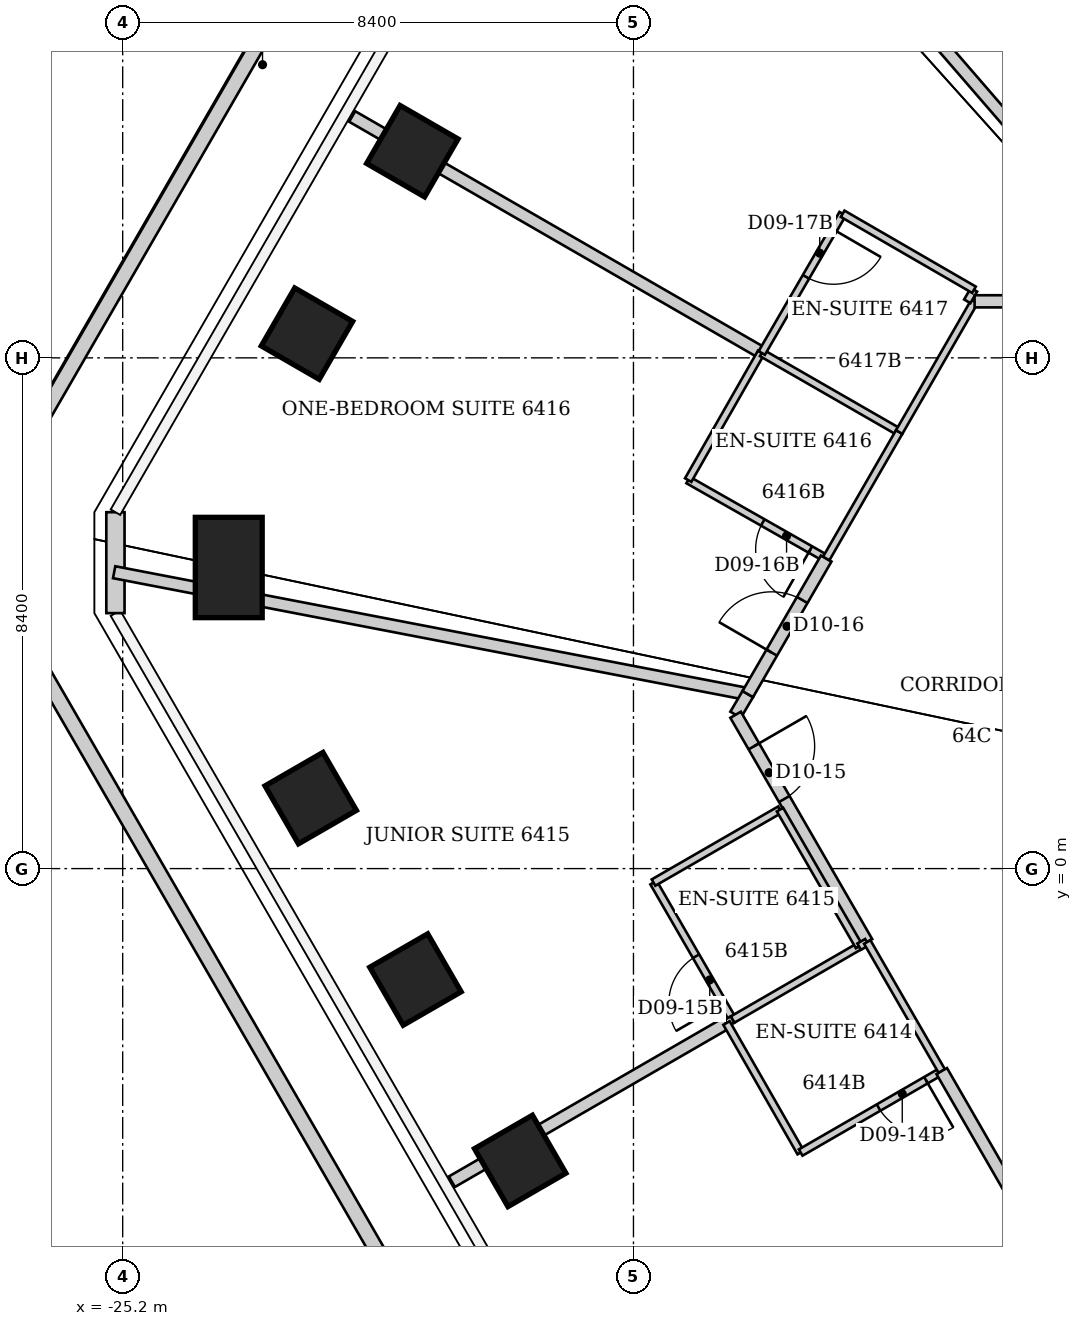
"""IFC4 building model, lengths in metres.
Left out: names, types, materials, properties, quantities, classifications, styles, units other than length and angle.
Written with IfcOpenShell. Run it as: python <this file> out.ifc"""

import sys

from ifc_helpers import new_model, si_unit, direction, frame, frame_2d, origin, origin_2d, place, context, subcontext, project, spatial, rectangle, extrude, clip, halfspace, element, fill, save


model = new_model("IFC4")
c1 = context("Model", 3, precision=1e-05, world=origin(), true_north=direction((0.0, 1.0)))
c2 = subcontext(c1, "Body", "Model", "MODEL_VIEW")
j1 = project(units=[si_unit("LENGTHUNIT", "METRE"), si_unit("PLANEANGLEUNIT", "RADIAN")], contexts=[c1])
p1 = place(None, origin())
s1 = spatial("IfcSite", under=j1, at=p1, CompositionType="ELEMENT")
p2 = place(p1, origin())
s2 = spatial("IfcBuilding", under=s1, at=p2, CompositionType="ELEMENT")
p3 = place(p2, frame((0.0, 0.0, 257.0)))
s3 = spatial("IfcBuildingStorey", under=s2, at=p3, CompositionType="ELEMENT", Elevation=257.0)
p4 = place(p3, frame((-18.663, -4.808, -0.052), z_axis=(0.0, 0.0, 1.0), x_axis=(-0.866025403784, -0.5, 0.0)))
e1 = element("IfcColumn", 1, at=p4, inside=s3, PredefinedType="COLUMN", context=c2, shape_type="SweptSolid", body=[
    clip(extrude(rectangle(XDim=1.1, YDim=1.1, at=origin_2d()), origin(), (0.0, 0.0, 1.0), 3.852), halfspace(frame((0.0, 0.0, 0.052)), True)),
])
p5 = place(p3, frame((-20.385, -1.824, -0.06), z_axis=(0.0, 0.0, 1.0), x_axis=(-0.866025403784, -0.5, 0.0)))
e2 = element("IfcColumn", 2, at=p5, inside=s3, PredefinedType="COLUMN", context=c2, shape_type="SweptSolid", body=[
    clip(extrude(rectangle(XDim=1.1, YDim=1.1, at=origin_2d()), origin(), (0.0, 0.0, 1.0), 3.86), halfspace(frame((0.0, 0.0, 0.06)), True)),
])
p6 = place(p3, frame((-22.108, 1.159, -0.067), z_axis=(0.0, 0.0, 1.0), x_axis=(-0.866025403784, -0.5, 0.0)))
e3 = element("IfcColumn", 3, at=p6, inside=s3, PredefinedType="COLUMN", context=c2, shape_type="SweptSolid", body=[
    clip(extrude(rectangle(XDim=1.1, YDim=1.1, at=origin_2d()), origin(), (0.0, 0.0, 1.0), 3.867), halfspace(frame((0.0, 0.0, 0.067)), True)),
])
p7 = place(p3, frame((-23.456, 4.952, -0.069), z_axis=(0.0, 0.0, 1.0), x_axis=(-1.0, 0.0, 0.0)))
e4 = element("IfcColumn", 4, at=p7, inside=s3, PredefinedType="COLUMN", context=c2, shape_type="SweptSolid", body=[
    clip(extrude(rectangle(XDim=1.1, YDim=1.65, at=origin_2d()), origin(), (0.0, 0.0, 1.0), 3.869), halfspace(frame((0.0, 0.0, 0.069)), True)),
])
p8 = place(p3, frame((-22.169, 8.798, -0.059), z_axis=(0.0, 0.0, 1.0), x_axis=(-0.866025403784, 0.5, 0.0)))
e5 = element("IfcColumn", 5, at=p8, inside=s3, PredefinedType="COLUMN", context=c2, shape_type="SweptSolid", body=[
    clip(extrude(rectangle(XDim=1.1, YDim=1.1, at=origin_2d()), origin(), (0.0, 0.0, 1.0), 3.859), halfspace(frame((0.0, 0.0, 0.059)), True)),
])
p9 = place(p3, frame((-20.437, 11.799, -0.051), z_axis=(0.0, 0.0, 1.0), x_axis=(-0.866025403784, 0.5, 0.0)))
e6 = element("IfcColumn", 6, at=p9, inside=s3, PredefinedType="COLUMN", context=c2, shape_type="SweptSolid", body=[
    clip(extrude(rectangle(XDim=1.1, YDim=1.1, at=origin_2d()), origin(), (0.0, 0.0, 1.0), 3.851), halfspace(frame((0.0, 0.0, 0.051)), True)),
])
p10 = place(p3, frame((-25.319, 4.202, 0.0), z_axis=(0.0, 0.0, 1.0), x_axis=(0.0, 1.0, 0.0)))
e7 = element("IfcWall", 7, at=p10, inside=s3, PredefinedType="SOLIDWALL", context=c2, shape_type="SweptSolid", body=[
    extrude(rectangle(XDim=1.66, YDim=0.3, at=frame_2d((0.83, 0.0))), origin(), (0.0, 0.0, 1.0), 3.64),
])
p11 = place(p3, frame((-18.994, 20.465, 0.0), z_axis=(0.0, 0.0, 1.0), x_axis=(-0.49999647861, -0.86602743685, 0.0)))
e8 = element("IfcWall", 8, at=p11, inside=s3, PredefinedType="PARAPET", context=c2, shape_type="SweptSolid", body=[
    extrude(rectangle(XDim=16.453, YDim=0.25, at=frame_2d((8.226, 0.0))), origin(), (0.0, 0.0, 1.0), 1.1),
])
p12 = place(p3, frame((-27.219, 4.456, 0.0), z_axis=(0.0, 0.0, 1.0), x_axis=(0.499998496786, -0.866026271663, 0.0)))
e9 = element("IfcWall", 9, at=p12, inside=s3, PredefinedType="PARAPET", context=c2, shape_type="SweptSolid", body=[
    extrude(rectangle(XDim=34.936, YDim=0.25, at=frame_2d((17.468, 0.0))), origin(), (0.0, 0.0, 1.0), 1.1),
])
p13 = place(p3, frame((-25.341, 4.874, 0.0), z_axis=(0.0, 0.0, 1.0), x_axis=(0.982001168061, -0.188874841966, 0.0)))
e10 = element("IfcWall", 10, at=p13, inside=s3, PredefinedType="PARTITIONING", context=c2, shape_type="SweptSolid", body=[
    extrude(rectangle(XDim=10.557, YDim=0.2, at=frame_2d((5.278, 0.0))), origin(), (0.0, 0.0, 1.0), 3.64),
])
p14 = place(p3, frame((-21.426, 12.37, 0.0), z_axis=(0.0, 0.0, 1.0), x_axis=(0.866202335538, -0.499693419917, 0.0)))
e11 = element("IfcWall", 11, at=p14, inside=s3, PredefinedType="PARTITIONING", context=c2, shape_type="SweptSolid", body=[
    extrude(rectangle(XDim=7.765, YDim=0.2, at=frame_2d((3.883, 0.0))), origin(), (0.0, 0.0, 1.0), 2.878),
])
p15 = place(p3, frame((-19.786, -5.15, 0.0), z_axis=(0.0, 0.0, 1.0), x_axis=(0.865819112627, 0.500357136663, 0.0)))
e12 = element("IfcWall", 12, at=p15, inside=s3, PredefinedType="PARTITIONING", context=c2, shape_type="SweptSolid", body=[
    extrude(rectangle(XDim=5.216, YDim=0.2, at=frame_2d((2.608, 0.0))), origin(), (0.0, 0.0, 1.0), 3.64),
])
p16 = place(p3, frame((-16.89, 19.507, 0.0), z_axis=(0.0, 0.0, 1.0), x_axis=(0.654250750888, -0.756277696989, 0.0)))
e13 = element("IfcWall", 13, at=p16, inside=s3, PredefinedType="PARTITIONING", context=c2, shape_type="SweptSolid", body=[
    extrude(rectangle(XDim=10.313, YDim=0.2, at=frame_2d((5.157, 0.0))), origin(), (0.0, 0.0, 1.0), 3.64),
])
p17 = place(p3, frame((-16.47, -0.23, 0.0), z_axis=(0.0, 0.0, 1.0), x_axis=(0.500291685314, -0.865856933682, 0.0)))
e14 = element("IfcWall", 14, at=p17, inside=s3, PredefinedType="PARTITIONING", context=c2, shape_type="SweptSolid", body=[
    extrude(rectangle(XDim=2.599, YDim=0.12, at=frame_2d((1.299, 0.0))), origin(), (0.0, 0.0, 1.0), 3.64),
])
p18 = place(p17, frame((1.399, 0.0, 0.0)))
e15 = element("IfcOpeningElement", 15, at=p18, cuts=e14, PredefinedType="OPENING", context=c2, shape_type="SweptSolid", body=[
    extrude(rectangle(XDim=0.9, YDim=2.03, at=frame_2d((0.45, 1.015))), frame((0.0, 0.06, 0.0), z_axis=(0.0, -1.0, 0.0), x_axis=(1.0, 0.0, 0.0)), (0.0, 0.0, 1.0), 0.12),
])
p19 = place(p3, frame((-15.9, 6.39, 0.0), z_axis=(0.0, 0.0, 1.0), x_axis=(0.869431908012, -0.494052787999, 0.0)))
e16 = element("IfcWall", 16, at=p19, inside=s3, PredefinedType="PARTITIONING", context=c2, shape_type="SweptSolid", body=[
    extrude(rectangle(XDim=2.611, YDim=0.12, at=frame_2d((1.305, 0.0))), origin(), (0.0, 0.0, 1.0), 3.64),
])
p20 = place(p19, frame((1.411, 0.0, 0.0)))
e17 = element("IfcOpeningElement", 17, at=p20, cuts=e16, PredefinedType="OPENING", context=c2, shape_type="SweptSolid", body=[
    extrude(rectangle(XDim=0.9, YDim=2.03, at=frame_2d((0.45, 1.015))), frame((0.0, 0.06, 0.0), z_axis=(0.0, -1.0, 0.0), x_axis=(1.0, 0.0, 0.0)), (0.0, 0.0, 1.0), 0.12),
])
p21 = place(p3, frame((-15.27, -2.54, 0.0), z_axis=(0.0, 0.0, 1.0), x_axis=(0.864612942288, 0.502438513678, 0.0)))
e18 = element("IfcWall", 18, at=p21, inside=s3, PredefinedType="PARTITIONING", context=c2, shape_type="SweptSolid", body=[
    extrude(rectangle(XDim=0.117, YDim=0.12, at=frame_2d((0.058, 0.0))), origin(), (0.0, 0.0, 1.0), 3.64),
])
p22 = place(p3, frame((-15.27, -2.54, 0.0), z_axis=(0.0, 0.0, 1.0), x_axis=(0.497027744361, -0.86773464915, 0.0)))
e19 = element("IfcWall", 19, at=p22, inside=s3, PredefinedType="PARTITIONING", context=c2, shape_type="SweptSolid", body=[
    extrude(rectangle(XDim=2.455, YDim=0.12, at=frame_2d((1.227, 0.0))), origin(), (0.0, 0.0, 1.0), 3.64),
])
p23 = place(p3, frame((-15.169, -2.482, 0.0), z_axis=(0.0, 0.0, 1.0), x_axis=(0.865723129019, 0.500523190154, 0.0)))
e20 = element("IfcWall", 20, at=p23, inside=s3, PredefinedType="PARTITIONING", context=c2, shape_type="SweptSolid", body=[
    extrude(rectangle(XDim=2.401, YDim=0.12, at=frame_2d((1.201, 0.0))), origin(), (0.0, 0.0, 1.0), 3.64),
])
p24 = place(p3, frame((-15.12, 2.53, 0.0), z_axis=(0.0, 0.0, 1.0), x_axis=(0.507290461451, 0.861775137562, 0.0)))
e21 = element("IfcWall", 21, at=p24, inside=s3, PredefinedType="PARTITIONING", context=c2, shape_type="SweptSolid", body=[
    extrude(rectangle(XDim=0.395, YDim=0.2, at=frame_2d((0.197, 0.0))), origin(), (0.0, 0.0, 1.0), 3.64),
])
p25 = place(p3, frame((-15.12, 2.53, 0.0), z_axis=(0.0, 0.0, 1.0), x_axis=(0.500151395541, -0.865937977882, 0.0)))
e22 = element("IfcWall", 22, at=p25, inside=s3, PredefinedType="PARTITIONING", context=c2, shape_type="SweptSolid", body=[
    extrude(rectangle(XDim=4.319, YDim=0.2, at=frame_2d((2.16, 0.0))), origin(), (0.0, 0.0, 1.0), 3.64),
])
p26 = place(p25, frame((0.6, 0.0, 0.0)))
e23 = element("IfcOpeningElement", 23, at=p26, cuts=e22, PredefinedType="OPENING", context=c2, shape_type="SweptSolid", body=[
    extrude(rectangle(XDim=1.0, YDim=2.13, at=frame_2d((0.5, 1.065))), frame((0.0, 0.1, 0.0), z_axis=(0.0, -1.0, 0.0), x_axis=(1.0, 0.0, 0.0)), (0.0, 0.0, 1.0), 0.2),
])
p27 = place(p3, frame((-14.92, 2.87, 0.0), z_axis=(0.0, 0.0, 1.0), x_axis=(0.500714932888, 0.865612243434, 0.0)))
e24 = element("IfcWall", 24, at=p27, inside=s3, PredefinedType="PARTITIONING", context=c2, shape_type="SweptSolid", body=[
    extrude(rectangle(XDim=2.576, YDim=0.2, at=frame_2d((1.288, 0.0))), origin(), (0.0, 0.0, 1.0), 3.64),
])
p28 = place(p27, frame((0.788, 0.0, 0.0)))
e25 = element("IfcOpeningElement", 25, at=p28, cuts=e24, PredefinedType="OPENING", context=c2, shape_type="SweptSolid", body=[
    extrude(rectangle(XDim=1.0, YDim=2.13, at=frame_2d((0.5, 1.065))), frame((0.0, 0.1, 0.0), z_axis=(0.0, -1.0, 0.0), x_axis=(1.0, 0.0, 0.0)), (0.0, 0.0, 1.0), 0.2),
])
p29 = place(p3, frame((-14.7, 8.49, 0.0), z_axis=(0.0, 0.0, 1.0), x_axis=(-0.496106327528, -0.868261776072, 0.0)))
e26 = element("IfcWall", 26, at=p29, inside=s3, PredefinedType="PARTITIONING", context=c2, shape_type="SweptSolid", body=[
    extrude(rectangle(XDim=2.419, YDim=0.12, at=frame_2d((1.209, 0.0))), origin(), (0.0, 0.0, 1.0), 3.64),
])
p30 = place(p3, frame((-14.69, 8.48, 0.0), z_axis=(0.0, 0.0, 1.0), x_axis=(0.866816256489, -0.498627694264, 0.0)))
e27 = element("IfcWall", 27, at=p30, inside=s3, PredefinedType="PARTITIONING", context=c2, shape_type="SweptSolid", body=[
    extrude(rectangle(XDim=2.607, YDim=0.12, at=frame_2d((1.304, 0.0))), origin(), (0.0, 0.0, 1.0), 2.878),
])
p31 = place(p3, frame((-14.39, 0.97, 0.0), z_axis=(0.0, 0.0, 1.0), x_axis=(-0.866202511239, -0.499693115345, 0.0)))
e28 = element("IfcWall", 28, at=p31, inside=s3, PredefinedType="PARTITIONING", context=c2, shape_type="SweptSolid", body=[
    extrude(rectangle(XDim=2.401, YDim=0.12, at=frame_2d((1.201, 0.0))), origin(), (0.0, 0.0, 1.0), 3.64),
])
p32 = place(p3, frame((-14.05, -4.67, 0.0), z_axis=(0.0, 0.0, 1.0), x_axis=(0.865968562295, 0.500098439427, 0.0)))
e29 = element("IfcWall", 29, at=p32, inside=s3, PredefinedType="PARTITIONING", context=c2, shape_type="SweptSolid", body=[
    extrude(rectangle(XDim=2.679, YDim=0.12, at=frame_2d((1.34, 0.0))), origin(), (0.0, 0.0, 1.0), 3.64),
])
p33 = place(p32, frame((1.479, 0.0, 0.0)))
e30 = element("IfcOpeningElement", 30, at=p33, cuts=e29, PredefinedType="OPENING", context=c2, shape_type="SweptSolid", body=[
    extrude(rectangle(XDim=0.9, YDim=2.03, at=frame_2d((0.45, 1.015))), frame((0.0, 0.06, 0.0), z_axis=(0.0, -1.0, 0.0), x_axis=(1.0, 0.0, 0.0)), (0.0, 0.0, 1.0), 0.12),
])
p34 = place(p3, frame((-13.63, 5.1, 0.0), z_axis=(0.0, 0.0, 1.0), x_axis=(0.499737123639, 0.866177122335, 0.0)))
e31 = element("IfcWall", 31, at=p34, inside=s3, PredefinedType="PARTITIONING", context=c2, shape_type="SweptSolid", body=[
    extrude(rectangle(XDim=2.401, YDim=0.12, at=frame_2d((1.201, 0.0))), origin(), (0.0, 0.0, 1.0), 3.64),
])
p35 = place(p3, frame((-13.36, 10.77, 0.0), z_axis=(0.0, 0.0, 1.0), x_axis=(-0.502173326652, -0.864766991738, 0.0)))
e32 = element("IfcWall", 32, at=p35, inside=s3, PredefinedType="PARTITIONING", context=c2, shape_type="SweptSolid", body=[
    extrude(rectangle(XDim=2.648, YDim=0.12, at=frame_2d((1.324, 0.0))), origin(), (0.0, 0.0, 1.0), 3.64),
])
p36 = place(p35, frame((0.3, 0.0, 0.0)))
e33 = element("IfcOpeningElement", 33, at=p36, cuts=e32, PredefinedType="OPENING", context=c2, shape_type="SweptSolid", body=[
    extrude(rectangle(XDim=0.9, YDim=2.03, at=frame_2d((0.45, 1.015))), frame((0.0, 0.06, 0.0), z_axis=(0.0, -1.0, 0.0), x_axis=(1.0, 0.0, 0.0)), (0.0, 0.0, 1.0), 0.12),
])
p37 = place(p3, frame((-13.09, -1.28, 0.0), z_axis=(0.0, 0.0, 1.0), x_axis=(-0.500291685314, 0.865856933682, 0.0)))
e34 = element("IfcWall", 34, at=p37, inside=s3, PredefinedType="PARTITIONING", context=c2, shape_type="SweptSolid", body=[
    extrude(rectangle(XDim=2.599, YDim=0.12, at=frame_2d((1.299, 0.0))), origin(), (0.0, 0.0, 1.0), 3.64),
])
p38 = place(p3, frame((-13.088, -1.283, 0.0), z_axis=(0.0, 0.0, 1.0), x_axis=(0.867120749652, 0.498097987873, 0.0)))
e35 = element("IfcWall", 35, at=p38, inside=s3, PredefinedType="PARTITIONING", context=c2, shape_type="SweptSolid", body=[
    extrude(rectangle(XDim=0.147, YDim=0.12, at=frame_2d((0.074, 0.0))), origin(), (0.0, 0.0, 1.0), 3.64),
])
p39 = place(p3, frame((-12.955, -1.207, 0.0), z_axis=(0.0, 0.0, 1.0), x_axis=(0.499920767294, -0.866071143976, 0.0)))
e36 = element("IfcWall", 36, at=p39, inside=s3, PredefinedType="PARTITIONING", context=c2, shape_type="SweptSolid", body=[
    extrude(rectangle(XDim=2.451, YDim=0.12, at=frame_2d((1.226, 0.0))), origin(), (0.0, 0.0, 1.0), 3.64),
])
p40 = place(p3, frame((-12.43, 7.18, 0.0), z_axis=(0.0, 0.0, 1.0), x_axis=(0.499577688184, 0.866269088372, 0.0)))
e37 = element("IfcWall", 37, at=p40, inside=s3, PredefinedType="PARTITIONING", context=c2, shape_type="SweptSolid", body=[
    extrude(rectangle(XDim=2.482, YDim=0.12, at=frame_2d((1.241, 0.0))), origin(), (0.0, 0.0, 1.0), 3.64),
])
p41 = place(p3, frame((-11.73, -3.33, 0.0), z_axis=(0.0, 0.0, 1.0), x_axis=(0.499214067722, -0.866478686748, 0.0)))
e38 = element("IfcWall", 38, at=p41, inside=s3, PredefinedType="PARTITIONING", context=c2, shape_type="SweptSolid", body=[
    extrude(rectangle(XDim=8.413, YDim=0.2, at=frame_2d((4.207, 0.0))), origin(), (0.0, 0.0, 1.0), 3.64),
])
p42 = place(p41, frame((3.707, 0.0, 0.0)))
e39 = element("IfcOpeningElement", 39, at=p42, cuts=e38, PredefinedType="OPENING", context=c2, shape_type="SweptSolid", body=[
    extrude(rectangle(XDim=1.0, YDim=2.13, at=frame_2d((0.5, 1.065))), frame((0.0, 0.1, 0.0), z_axis=(0.0, -1.0, 0.0), x_axis=(1.0, 0.0, 0.0)), (0.0, 0.0, 1.0), 0.2),
])
p43 = place(p3, frame((-11.31, 9.33, 0.0), z_axis=(0.0, 0.0, 1.0), x_axis=(0.501518373175, 0.865146994081, 0.0)))
e40 = element("IfcWall", 40, at=p43, inside=s3, PredefinedType="PARTITIONING", context=c2, shape_type="SweptSolid", body=[
    extrude(rectangle(XDim=0.219, YDim=0.12, at=frame_2d((0.11, 0.0))), origin(), (0.0, 0.0, 1.0), 3.64),
])
p44 = place(p3, frame((-11.2, 9.52, 0.0), z_axis=(0.0, 0.0, 1.0), x_axis=(-0.865533423938, 0.500851167559, 0.0)))
e41 = element("IfcWall", 41, at=p44, inside=s3, PredefinedType="PARTITIONING", context=c2, shape_type="SweptSolid", body=[
    extrude(rectangle(XDim=2.496, YDim=0.12, at=frame_2d((1.248, 0.0))), origin(), (0.0, 0.0, 1.0), 3.64),
])
p45 = place(p3, frame((-8.08, 9.33, 0.0), z_axis=(0.0, 0.0, 1.0), x_axis=(-1.0, 0.0, 0.0)))
e42 = element("IfcWall", 42, at=p45, inside=s3, PredefinedType="PARTITIONING", context=c2, shape_type="SweptSolid", body=[
    extrude(rectangle(XDim=3.11, YDim=0.2, at=frame_2d((1.555, 0.0))), origin(), (0.0, 0.0, 1.0), 3.64),
])
p46 = place(p45, frame((1.055, 0.0, 0.0)))
e43 = element("IfcOpeningElement", 43, at=p46, cuts=e42, PredefinedType="OPENING", context=c2, shape_type="SweptSolid", body=[
    extrude(rectangle(XDim=1.0, YDim=2.13, at=frame_2d((0.5, 1.065))), frame((0.0, 0.1, 0.0), z_axis=(0.0, -1.0, 0.0), x_axis=(1.0, 0.0, 0.0)), (0.0, 0.0, 1.0), 0.2),
])
p47 = place(p33, origin())
e44 = element("IfcDoor", 44, at=p47, inside=s3, OperationType="SINGLE_SWING_RIGHT", PredefinedType="DOOR", context=c2, shape_type="SweptSolid", body=[
    extrude(rectangle(XDim=0.9, YDim=2.03, at=frame_2d((0.45, 1.015))), frame((0.0, 0.025, 0.0), z_axis=(0.0, -1.0, 0.0), x_axis=(1.0, 0.0, 0.0)), (0.0, 0.0, 1.0), 0.05),
])
fill(e30, e44)
p48 = place(p26, origin())
e45 = element("IfcDoor", 45, at=p48, inside=s3, OperationType="SINGLE_SWING_LEFT", PredefinedType="DOOR", context=c2, shape_type="SweptSolid", body=[
    extrude(rectangle(XDim=1.0, YDim=2.13, at=frame_2d((0.5, 1.065))), frame((0.0, 0.025, 0.0), z_axis=(0.0, -1.0, 0.0), x_axis=(1.0, 0.0, 0.0)), (0.0, 0.0, 1.0), 0.05),
])
fill(e23, e45)
p49 = place(p18, origin())
e46 = element("IfcDoor", 46, at=p49, inside=s3, OperationType="SINGLE_SWING_RIGHT", PredefinedType="DOOR", context=c2, shape_type="SweptSolid", body=[
    extrude(rectangle(XDim=0.9, YDim=2.03, at=frame_2d((0.45, 1.015))), frame((0.0, 0.025, 0.0), z_axis=(0.0, -1.0, 0.0), x_axis=(1.0, 0.0, 0.0)), (0.0, 0.0, 1.0), 0.05),
])
fill(e15, e46)
p50 = place(p28, origin())
e47 = element("IfcDoor", 47, at=p50, inside=s3, OperationType="SINGLE_SWING_LEFT", PredefinedType="DOOR", context=c2, shape_type="SweptSolid", body=[
    extrude(rectangle(XDim=1.0, YDim=2.13, at=frame_2d((0.5, 1.065))), frame((0.0, 0.025, 0.0), z_axis=(0.0, -1.0, 0.0), x_axis=(1.0, 0.0, 0.0)), (0.0, 0.0, 1.0), 0.05),
])
fill(e25, e47)
p51 = place(p20, origin())
e48 = element("IfcDoor", 48, at=p51, inside=s3, OperationType="SINGLE_SWING_RIGHT", PredefinedType="DOOR", context=c2, shape_type="SweptSolid", body=[
    extrude(rectangle(XDim=0.9, YDim=2.03, at=frame_2d((0.45, 1.015))), frame((0.0, 0.025, 0.0), z_axis=(0.0, -1.0, 0.0), x_axis=(1.0, 0.0, 0.0)), (0.0, 0.0, 1.0), 0.05),
])
fill(e17, e48)
p52 = place(p36, origin())
e49 = element("IfcDoor", 49, at=p52, inside=s3, OperationType="SINGLE_SWING_LEFT", PredefinedType="DOOR", context=c2, shape_type="SweptSolid", body=[
    extrude(rectangle(XDim=0.9, YDim=2.03, at=frame_2d((0.45, 1.015))), frame((0.0, 0.025, 0.0), z_axis=(0.0, -1.0, 0.0), x_axis=(1.0, 0.0, 0.0)), (0.0, 0.0, 1.0), 0.05),
])
fill(e33, e49)
save(model, sys.argv[1])
